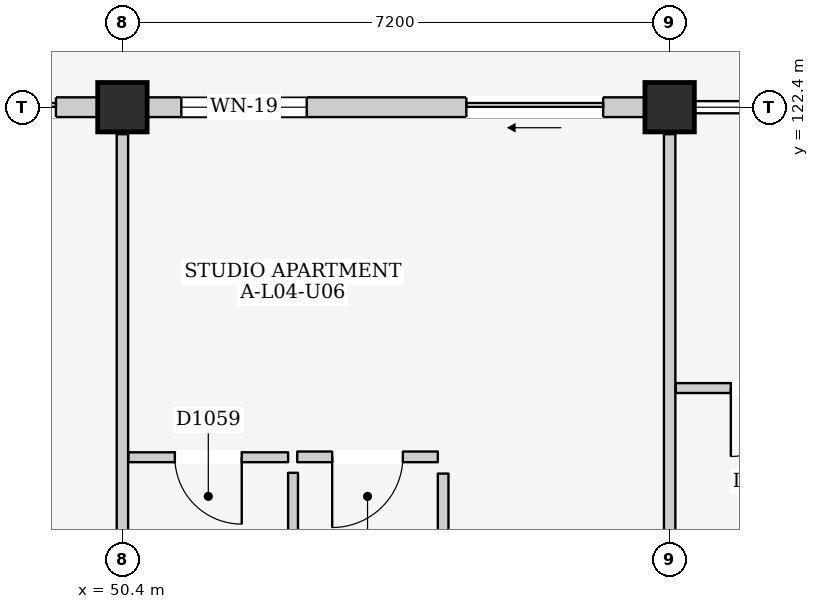
"""IFC4 building model, lengths in metres.
Left out: names, types, materials, properties, quantities, classifications, styles, units other than length and angle.
Written with IfcOpenShell. Run it as: python <this file> out.ifc"""

import sys

from ifc_helpers import new_model, si_unit, direction, frame, frame_2d, origin, origin_2d, place, context, subcontext, project, spatial, rectangle, extrude, element, fill, save


model = new_model("IFC4")
c1 = context("Model", 3, precision=1e-05, world=origin(), true_north=direction((0.0, 1.0)))
c2 = subcontext(c1, "Body", "Model", "MODEL_VIEW")
j1 = project(units=[si_unit("LENGTHUNIT", "METRE"), si_unit("PLANEANGLEUNIT", "RADIAN")], contexts=[c1])
p1 = place(None, origin())
s1 = spatial("IfcSite", under=j1, at=p1, CompositionType="ELEMENT")
p2 = place(p1, origin())
s2 = spatial("IfcBuilding", under=s1, at=p2, CompositionType="ELEMENT")
p3 = place(p2, frame((0.0, 0.0, 15.4)))
s3 = spatial("IfcBuildingStorey", under=s2, at=p3, CompositionType="ELEMENT", Elevation=15.4)
for number, where, z_axis, x_axis in (
    (1, (50.4, 122.4, 0.0), (0.0, 0.0, 1.0), (1.0, 0.0, 0.0)),
    (2, (57.6, 122.4, 0.0), (0.0, 0.0, 1.0), (1.0, 0.0, 0.0)),
):
    element("IfcColumn", number, at=place(p3, frame(where, z_axis=z_axis, x_axis=x_axis)), inside=s3, PredefinedType="COLUMN", context=c2, shape_type="SweptSolid", body=[
        extrude(rectangle(XDim=0.65, YDim=0.65, at=origin_2d()), origin(), (0.0, 0.0, 1.0), 3.2),
    ])
p4 = place(p3, frame((43.525, 122.4, 0.0), z_axis=(0.0, 0.0, 1.0), x_axis=(1.0, 0.0, 0.0)))
e3 = element("IfcWall", 3, at=p4, inside=s3, PredefinedType="ELEMENTEDWALL", context=c2, shape_type="SweptSolid", body=[
    extrude(rectangle(XDim=6.55, YDim=0.26, at=frame_2d((3.275, 0.0))), origin(), (0.0, 0.0, 1.0), 2.43),
])
p5 = place(p4, frame((4.6, 0.0, 0.0)))
e4 = element("IfcOpeningElement", 4, at=p5, cuts=e3, PredefinedType="OPENING", context=c2, shape_type="SweptSolid", body=[
    extrude(rectangle(XDim=1.4, YDim=2.1, at=frame_2d((0.7, 1.05))), frame((0.0, 0.145, 0.0), z_axis=(0.0, -1.0, 0.0), x_axis=(1.0, 0.0, 0.0)), (0.0, 0.0, 1.0), 0.29),
])
p6 = place(p4, frame((0.45, 0.0, 0.76)))
e5 = element("IfcOpeningElement", 5, at=p6, cuts=e3, PredefinedType="OPENING", context=c2, shape_type="SweptSolid", body=[
    extrude(rectangle(XDim=1.95, YDim=1.55, at=frame_2d((0.975, 0.775))), frame((0.0, 0.145, 0.0), z_axis=(0.0, -1.0, 0.0), x_axis=(1.0, 0.0, 0.0)), (0.0, 0.0, 1.0), 0.29),
])
p7 = place(p3, frame((50.725, 122.4, 0.0), z_axis=(0.0, 0.0, 1.0), x_axis=(1.0, 0.0, 0.0)))
e6 = element("IfcWall", 6, at=p7, inside=s3, PredefinedType="ELEMENTEDWALL", context=c2, shape_type="SweptSolid", body=[
    extrude(rectangle(XDim=6.55, YDim=0.26, at=frame_2d((3.275, 0.0))), origin(), (0.0, 0.0, 1.0), 2.43),
])
p8 = place(p7, frame((4.2, 0.0, 0.0)))
e7 = element("IfcOpeningElement", 7, at=p8, cuts=e6, PredefinedType="OPENING", context=c2, shape_type="SweptSolid", body=[
    extrude(rectangle(XDim=1.8, YDim=2.12, at=frame_2d((0.9, 1.06))), frame((0.0, 0.145, 0.0), z_axis=(0.0, -1.0, 0.0), x_axis=(1.0, 0.0, 0.0)), (0.0, 0.0, 1.0), 0.29),
])
p9 = place(p7, frame((0.45, 0.0, 0.9)))
e8 = element("IfcOpeningElement", 8, at=p9, cuts=e6, PredefinedType="OPENING", context=c2, shape_type="SweptSolid", body=[
    extrude(rectangle(XDim=1.65, YDim=1.35, at=frame_2d((0.825, 0.675))), frame((0.0, 0.145, 0.0), z_axis=(0.0, -1.0, 0.0), x_axis=(1.0, 0.0, 0.0)), (0.0, 0.0, 1.0), 0.29),
])
for number, where, z_axis, x_axis in (
    (9, (50.4, 115.555, 0.0), (0.0, 0.0, 1.0), (0.0, 1.0, 0.0)),
    (10, (57.6, 115.555, 0.0), (0.0, 0.0, 1.0), (0.0, 1.0, 0.0)),
):
    element("IfcWall", number, at=place(p3, frame(where, z_axis=z_axis, x_axis=x_axis)), inside=s3, PredefinedType="PARTITIONING", context=c2, shape_type="SweptSolid", body=[
        extrude(rectangle(XDim=6.49, YDim=0.15, at=frame_2d((3.245, 0.0))), origin(), (0.0, 0.0, 1.0), 2.385),
    ])
p10 = place(p3, frame((50.48, 117.795, 0.0), z_axis=(0.0, 0.0, 1.0), x_axis=(1.0, 0.0, 0.0)))
e11 = element("IfcWall", 11, at=p10, inside=s3, PredefinedType="PARTITIONING", context=c2, shape_type="SweptSolid", body=[
    extrude(rectangle(XDim=2.1, YDim=0.13, at=frame_2d((1.05, 0.0))), origin(), (0.0, 0.0, 1.0), 2.95),
])
p11 = place(p10, frame((0.61, 0.0, 0.0)))
e12 = element("IfcOpeningElement", 12, at=p11, cuts=e11, PredefinedType="OPENING", context=c2, shape_type="SweptSolid", body=[
    extrude(rectangle(XDim=0.88, YDim=2.1, at=frame_2d((0.44, 1.05))), frame((0.0, 0.08, 0.0), z_axis=(0.0, -1.0, 0.0), x_axis=(1.0, 0.0, 0.0)), (0.0, 0.0, 1.0), 0.16),
])
p12 = place(p3, frame((52.645, 115.46, 0.0), z_axis=(0.0, 0.0, 1.0), x_axis=(0.0, 1.0, 0.0)))
e13 = element("IfcWall", 13, at=p12, inside=s3, PredefinedType="PARTITIONING", context=c2, shape_type="SweptSolid", body=[
    extrude(rectangle(XDim=2.13, YDim=0.13, at=frame_2d((1.065, 0.0))), origin(), (0.0, 0.0, 1.0), 2.95),
])
p13 = place(p3, frame((52.7, 117.8, 0.0), z_axis=(0.0, 0.0, 1.0), x_axis=(1.0, 0.0, 0.0)))
e14 = element("IfcWall", 14, at=p13, inside=s3, PredefinedType="PARTITIONING", context=c2, shape_type="SweptSolid", body=[
    extrude(rectangle(XDim=1.85, YDim=0.14, at=frame_2d((0.925, 0.0))), origin(), (0.0, 0.0, 1.0), 2.95),
])
p14 = place(p13, frame((0.46, 0.0, 0.0)))
e15 = element("IfcOpeningElement", 15, at=p14, cuts=e14, PredefinedType="OPENING", context=c2, shape_type="SweptSolid", body=[
    extrude(rectangle(XDim=0.93, YDim=2.14, at=frame_2d((0.465, 1.07))), frame((0.0, 0.085, 0.0), z_axis=(0.0, -1.0, 0.0), x_axis=(1.0, 0.0, 0.0)), (0.0, 0.0, 1.0), 0.17),
])
p15 = place(p3, frame((54.62, 115.43, 0.0), z_axis=(0.0, 0.0, 1.0), x_axis=(0.0, 1.0, 0.0)))
e16 = element("IfcWall", 16, at=p15, inside=s3, PredefinedType="PARTITIONING", context=c2, shape_type="SweptSolid", body=[
    extrude(rectangle(XDim=2.15, YDim=0.14, at=frame_2d((1.075, 0.0))), origin(), (0.0, 0.0, 1.0), 2.95),
])
p16 = place(p3, frame((57.68, 118.705, 0.0), z_axis=(0.0, 0.0, 1.0), x_axis=(1.0, 0.0, 0.0)))
e17 = element("IfcWall", 17, at=p16, inside=s3, PredefinedType="PARTITIONING", context=c2, shape_type="SweptSolid", body=[
    extrude(rectangle(XDim=2.35, YDim=0.13, at=frame_2d((1.175, 0.0))), origin(), (0.0, 0.0, 1.0), 2.95),
])
p17 = place(p16, frame((0.725, 0.0, 0.0)))
e18 = element("IfcOpeningElement", 18, at=p17, cuts=e17, PredefinedType="OPENING", context=c2, shape_type="SweptSolid", body=[
    extrude(rectangle(XDim=0.9, YDim=2.1, at=frame_2d((0.45, 1.05))), frame((0.0, 0.08, 0.0), z_axis=(0.0, -1.0, 0.0), x_axis=(1.0, 0.0, 0.0)), (0.0, 0.0, 1.0), 0.16),
])
p18 = place(p5, frame((1.4, 0.0, 0.0), z_axis=(0.0, 0.0, 1.0), x_axis=(-1.0, 0.0, 0.0)))
e19 = element("IfcDoor", 19, at=p18, inside=s3, OperationType="SLIDING_TO_RIGHT", PredefinedType="DOOR", context=c2, shape_type="SweptSolid", body=[
    extrude(rectangle(XDim=1.4, YDim=2.1, at=frame_2d((0.7, 1.05))), frame((0.0, 0.025, 0.0), z_axis=(0.0, -1.0, 0.0), x_axis=(1.0, 0.0, 0.0)), (0.0, 0.0, 1.0), 0.05),
])
fill(e4, e19)
p19 = place(p8, frame((1.8, 0.0, 0.0), z_axis=(0.0, 0.0, 1.0), x_axis=(-1.0, 0.0, 0.0)))
e20 = element("IfcDoor", 20, at=p19, inside=s3, OperationType="SLIDING_TO_LEFT", PredefinedType="DOOR", context=c2, shape_type="SweptSolid", body=[
    extrude(rectangle(XDim=1.8, YDim=2.12, at=frame_2d((0.9, 1.06))), frame((0.0, 0.025, 0.0), z_axis=(0.0, -1.0, 0.0), x_axis=(1.0, 0.0, 0.0)), (0.0, 0.0, 1.0), 0.05),
])
fill(e7, e20)
p20 = place(p9, origin())
e21 = element("IfcWindow", 21, at=p20, inside=s3, PartitioningType="DOUBLE_PANEL_VERTICAL", PredefinedType="WINDOW", context=c2, shape_type="SweptSolid", body=[
    extrude(rectangle(XDim=1.65, YDim=1.35, at=frame_2d((0.825, 0.675))), frame((0.0, 0.03, 0.0), z_axis=(0.0, -1.0, 0.0), x_axis=(1.0, 0.0, 0.0)), (0.0, 0.0, 1.0), 0.06),
])
fill(e8, e21)
p21 = place(p11, frame((0.88, 0.0, 0.0), z_axis=(0.0, 0.0, 1.0), x_axis=(-1.0, 0.0, 0.0)))
e22 = element("IfcDoor", 22, at=p21, inside=s3, OperationType="SINGLE_SWING_LEFT", PredefinedType="DOOR", context=c2, shape_type="SweptSolid", body=[
    extrude(rectangle(XDim=0.88, YDim=2.1, at=frame_2d((0.44, 1.05))), frame((0.0, 0.025, 0.0), z_axis=(0.0, -1.0, 0.0), x_axis=(1.0, 0.0, 0.0)), (0.0, 0.0, 1.0), 0.05),
])
fill(e12, e22)
p22 = place(p14, frame((0.93, 0.0, 0.0), z_axis=(0.0, 0.0, 1.0), x_axis=(-1.0, 0.0, 0.0)))
e23 = element("IfcDoor", 23, at=p22, inside=s3, OperationType="SINGLE_SWING_RIGHT", PredefinedType="DOOR", context=c2, shape_type="SweptSolid", body=[
    extrude(rectangle(XDim=0.93, YDim=2.14, at=frame_2d((0.465, 1.07))), frame((0.0, 0.025, 0.0), z_axis=(0.0, -1.0, 0.0), x_axis=(1.0, 0.0, 0.0)), (0.0, 0.0, 1.0), 0.05),
])
fill(e15, e23)
p23 = place(p17, frame((0.9, 0.0, 0.0), z_axis=(0.0, 0.0, 1.0), x_axis=(-1.0, 0.0, 0.0)))
e24 = element("IfcDoor", 24, at=p23, inside=s3, OperationType="SINGLE_SWING_RIGHT", PredefinedType="DOOR", context=c2, shape_type="SweptSolid", body=[
    extrude(rectangle(XDim=0.9, YDim=2.1, at=frame_2d((0.45, 1.05))), frame((0.0, 0.025, 0.0), z_axis=(0.0, -1.0, 0.0), x_axis=(1.0, 0.0, 0.0)), (0.0, 0.0, 1.0), 0.05),
])
fill(e18, e24)
save(model, sys.argv[1])
